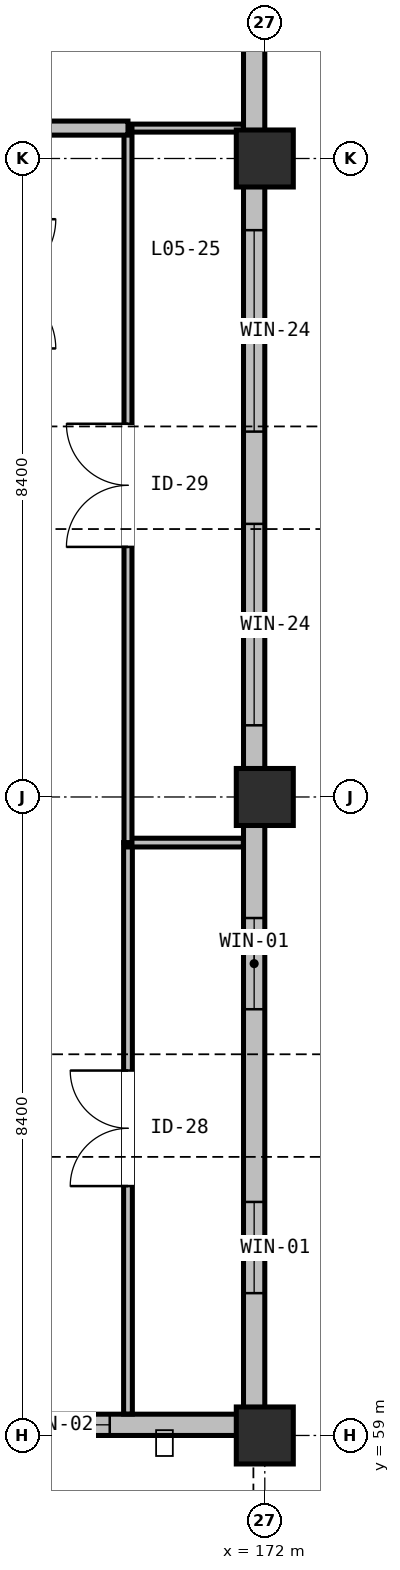
"""IFC4 building model, lengths in metres.
Left out: names, types, materials, properties, quantities, classifications, styles, units other than length and angle.
Written with IfcOpenShell. Run it as: python <this file> out.ifc"""

import sys

from ifc_helpers import new_model, si_unit, direction, frame, frame_2d, origin, origin_2d, place, context, subcontext, project, spatial, rectangle, extrude, element, fill, save


model = new_model("IFC4")
c1 = context("Model", 3, precision=1e-05, world=origin(), true_north=direction((0.0, 1.0)))
c2 = subcontext(c1, "Body", "Model", "MODEL_VIEW")
j1 = project(units=[si_unit("LENGTHUNIT", "METRE"), si_unit("PLANEANGLEUNIT", "RADIAN")], contexts=[c1])
p1 = place(None, origin())
s1 = spatial("IfcSite", under=j1, at=p1, CompositionType="ELEMENT")
p2 = place(p1, origin())
s2 = spatial("IfcBuilding", under=s1, at=p2, CompositionType="ELEMENT")
p3 = place(p2, frame((0.0, 0.0, 24.0)))
s3 = spatial("IfcBuildingStorey", under=s2, at=p3, CompositionType="ELEMENT", Elevation=24.0)
for number, where, z_axis, x_axis in (
    (1, (172.0, 59.0, 0.0), (0.0, 0.0, 1.0), (1.0, 0.0, 0.0)),
    (2, (172.0, 67.4, 0.0), (0.0, 0.0, 1.0), (1.0, 0.0, 0.0)),
    (3, (172.0, 75.8, 0.0), (0.0, 0.0, 1.0), (1.0, 0.0, 0.0)),
):
    element("IfcColumn", number, at=place(p3, frame(where, z_axis=z_axis, x_axis=x_axis)), inside=s3, PredefinedType="COLUMN", context=c2, shape_type="SweptSolid", body=[
        extrude(rectangle(XDim=0.75, YDim=0.75, at=origin_2d()), origin(), (0.0, 0.0, 1.0), 4.5),
    ])
p4 = place(p3, frame((171.86, 83.92, 0.0), z_axis=(0.0, 0.0, 1.0), x_axis=(0.0, -1.0, 0.0)))
e4 = element("IfcWall", 4, at=p4, inside=s3, PredefinedType="STANDARD", context=c2, shape_type="SweptSolid", body=[
    extrude(rectangle(XDim=8.12, YDim=0.28, at=frame_2d((4.06, 0.0))), origin(), (0.0, 0.0, 1.0), 3.885),
])
p5 = place(p4, frame((1.717, 0.0, 0.9)))
e5 = element("IfcOpeningElement", 5, at=p5, cuts=e4, PredefinedType="OPENING", context=c2, shape_type="SweptSolid", body=[
    extrude(rectangle(XDim=0.95, YDim=1.8, at=frame_2d((0.475, 0.9))), frame((0.0, 0.15, 0.0), z_axis=(0.0, -1.0, 0.0), x_axis=(1.0, 0.0, 0.0)), (0.0, 0.0, 1.0), 0.3),
])
p6 = place(p4, frame((5.453, 0.0, 0.9)))
e6 = element("IfcOpeningElement", 6, at=p6, cuts=e4, PredefinedType="OPENING", context=c2, shape_type="SweptSolid", body=[
    extrude(rectangle(XDim=0.95, YDim=1.8, at=frame_2d((0.475, 0.9))), frame((0.0, 0.15, 0.0), z_axis=(0.0, -1.0, 0.0), x_axis=(1.0, 0.0, 0.0)), (0.0, 0.0, 1.0), 0.3),
])
p7 = place(p3, frame((171.86, 75.8, 0.0), z_axis=(0.0, 0.0, 1.0), x_axis=(0.0, -1.0, 0.0)))
e7 = element("IfcWall", 7, at=p7, inside=s3, PredefinedType="STANDARD", context=c2, shape_type="SweptSolid", body=[
    extrude(rectangle(XDim=8.4, YDim=0.28, at=frame_2d((4.2, 0.0))), origin(), (0.0, 0.0, 1.0), 3.885),
])
p8 = place(p7, frame((0.943, 0.0, 0.9)))
e8 = element("IfcOpeningElement", 8, at=p8, cuts=e7, PredefinedType="OPENING", context=c2, shape_type="SweptSolid", body=[
    extrude(rectangle(XDim=2.65, YDim=1.85, at=frame_2d((1.325, 0.925))), frame((0.0, 0.15, 0.0), z_axis=(0.0, -1.0, 0.0), x_axis=(1.0, 0.0, 0.0)), (0.0, 0.0, 1.0), 0.3),
])
p9 = place(p7, frame((4.807, 0.0, 0.9)))
e9 = element("IfcOpeningElement", 9, at=p9, cuts=e7, PredefinedType="OPENING", context=c2, shape_type="SweptSolid", body=[
    extrude(rectangle(XDim=2.65, YDim=1.85, at=frame_2d((1.325, 0.925))), frame((0.0, 0.15, 0.0), z_axis=(0.0, -1.0, 0.0), x_axis=(1.0, 0.0, 0.0)), (0.0, 0.0, 1.0), 0.3),
])
p10 = place(p3, frame((171.86, 67.4, 0.0), z_axis=(0.0, 0.0, 1.0), x_axis=(0.0, -1.0, 0.0)))
e10 = element("IfcWall", 10, at=p10, inside=s3, PredefinedType="STANDARD", context=c2, shape_type="SweptSolid", body=[
    extrude(rectangle(XDim=8.12, YDim=0.28, at=frame_2d((4.06, 0.0))), origin(), (0.0, 0.0, 1.0), 3.885),
])
p11 = place(p10, frame((1.592, 0.0, 0.9)))
e11 = element("IfcOpeningElement", 11, at=p11, cuts=e10, PredefinedType="OPENING", context=c2, shape_type="SweptSolid", body=[
    extrude(rectangle(XDim=1.2, YDim=2.1, at=frame_2d((0.6, 1.05))), frame((0.0, 0.15, 0.0), z_axis=(0.0, -1.0, 0.0), x_axis=(1.0, 0.0, 0.0)), (0.0, 0.0, 1.0), 0.3),
])
p12 = place(p10, frame((5.328, 0.0, 0.9)))
e12 = element("IfcOpeningElement", 12, at=p12, cuts=e10, PredefinedType="OPENING", context=c2, shape_type="SweptSolid", body=[
    extrude(rectangle(XDim=1.2, YDim=2.1, at=frame_2d((0.6, 1.05))), frame((0.0, 0.15, 0.0), z_axis=(0.0, -1.0, 0.0), x_axis=(1.0, 0.0, 0.0)), (0.0, 0.0, 1.0), 0.3),
])
p13 = place(p3, frame((172.0, 59.14, 0.0), z_axis=(0.0, 0.0, 1.0), x_axis=(-1.0, 0.0, 0.0)))
e13 = element("IfcWall", 13, at=p13, inside=s3, PredefinedType="STANDARD", context=c2, shape_type="SweptSolid", body=[
    extrude(rectangle(XDim=6.8, YDim=0.28, at=frame_2d((3.4, 0.0))), origin(), (0.0, 0.0, 1.0), 3.735),
])
p14 = place(p13, frame((2.04, 0.0, 0.9)))
e14 = element("IfcOpeningElement", 14, at=p14, cuts=e13, PredefinedType="OPENING", context=c2, shape_type="SweptSolid", body=[
    extrude(rectangle(XDim=1.35, YDim=2.1, at=frame_2d((0.675, 1.05))), frame((0.0, 0.15, 0.0), z_axis=(0.0, -1.0, 0.0), x_axis=(1.0, 0.0, 0.0)), (0.0, 0.0, 1.0), 0.3),
])
p15 = place(p13, frame((4.289, 0.0, 0.9)))
e15 = element("IfcOpeningElement", 15, at=p15, cuts=e13, PredefinedType="OPENING", context=c2, shape_type="SweptSolid", body=[
    extrude(rectangle(XDim=1.35, YDim=2.1, at=frame_2d((0.675, 1.05))), frame((0.0, 0.15, 0.0), z_axis=(0.0, -1.0, 0.0), x_axis=(1.0, 0.0, 0.0)), (0.0, 0.0, 1.0), 0.3),
])
p16 = place(p3, frame((170.2, 59.282, 0.0), z_axis=(0.0, 0.0, 1.0), x_axis=(0.0, 1.0, 0.0)))
e16 = element("IfcWall", 16, at=p16, inside=s3, PredefinedType="PARTITIONING", context=c2, shape_type="SweptSolid", body=[
    extrude(rectangle(XDim=7.518, YDim=0.115, at=frame_2d((3.759, 0.0))), origin(), (0.0, 0.0, 1.0), 4.215),
])
p17 = place(p16, frame((2.999, 0.0, 0.0)))
e17 = element("IfcOpeningElement", 17, at=p17, cuts=e16, PredefinedType="OPENING", context=c2, shape_type="SweptSolid", body=[
    extrude(rectangle(XDim=1.52, YDim=2.14, at=frame_2d((0.76, 1.07))), frame((0.0, 0.067, 0.0), z_axis=(0.0, -1.0, 0.0), x_axis=(1.0, 0.0, 0.0)), (0.0, 0.0, 1.0), 0.135),
])
p18 = place(p3, frame((170.2, 66.8, 0.0), z_axis=(0.0, 0.0, 1.0), x_axis=(1.0, 0.0, 0.0)))
e18 = element("IfcWall", 18, at=p18, inside=s3, PredefinedType="PARTITIONING", context=c2, shape_type="SweptSolid", body=[
    extrude(rectangle(XDim=1.518, YDim=0.115, at=frame_2d((0.759, 0.0))), origin(), (0.0, 0.0, 1.0), 4.215),
])
p19 = place(p3, frame((170.2, 76.2, 0.0), z_axis=(0.0, 0.0, 1.0), x_axis=(1.0, 0.0, 0.0)))
e19 = element("IfcWall", 19, at=p19, inside=s3, PredefinedType="PARTITIONING", context=c2, shape_type="SweptSolid", body=[
    extrude(rectangle(XDim=1.518, YDim=0.105, at=frame_2d((0.759, 0.0))), origin(), (0.0, 0.0, 1.0), 4.215),
])
p20 = place(p3, frame((170.2, 66.8, 0.0), z_axis=(0.0, 0.0, 1.0), x_axis=(0.0, 1.0, 0.0)))
e20 = element("IfcWall", 20, at=p20, inside=s3, PredefinedType="PARTITIONING", context=c2, shape_type="SweptSolid", body=[
    extrude(rectangle(XDim=9.4, YDim=0.105, at=frame_2d((4.7, 0.0))), origin(), (0.0, 0.0, 1.0), 3.885),
])
p21 = place(p20, frame((3.89, 0.0, 0.0)))
e21 = element("IfcOpeningElement", 21, at=p21, cuts=e20, PredefinedType="OPENING", context=c2, shape_type="SweptSolid", body=[
    extrude(rectangle(XDim=1.62, YDim=2.14, at=frame_2d((0.81, 1.07))), frame((0.0, 0.062, 0.0), z_axis=(0.0, -1.0, 0.0), x_axis=(1.0, 0.0, 0.0)), (0.0, 0.0, 1.0), 0.125),
])
p22 = place(p3, frame((170.2, 76.2, 0.0), z_axis=(0.0, 0.0, 1.0), x_axis=(-1.0, 0.0, 0.0)))
e22 = element("IfcWall", 22, at=p22, inside=s3, PredefinedType="PARTITIONING", context=c2, shape_type="SweptSolid", body=[
    extrude(rectangle(XDim=1.8, YDim=0.185, at=frame_2d((0.9, 0.0))), origin(), (0.0, 0.0, 1.0), 3.985),
])
p23 = place(p8, origin())
e23 = element("IfcWindow", 23, at=p23, inside=s3, PartitioningType="SINGLE_PANEL", PredefinedType="WINDOW", context=c2, shape_type="SweptSolid", body=[
    extrude(rectangle(XDim=2.65, YDim=1.85, at=frame_2d((1.325, 0.925))), frame((0.0, 0.03, 0.0), z_axis=(0.0, -1.0, 0.0), x_axis=(1.0, 0.0, 0.0)), (0.0, 0.0, 1.0), 0.06),
])
fill(e8, e23)
p24 = place(p9, origin())
e24 = element("IfcWindow", 24, at=p24, inside=s3, PartitioningType="SINGLE_PANEL", PredefinedType="WINDOW", context=c2, shape_type="SweptSolid", body=[
    extrude(rectangle(XDim=2.65, YDim=1.85, at=frame_2d((1.325, 0.925))), frame((0.0, 0.03, 0.0), z_axis=(0.0, -1.0, 0.0), x_axis=(1.0, 0.0, 0.0)), (0.0, 0.0, 1.0), 0.06),
])
fill(e9, e24)
p25 = place(p11, origin())
e25 = element("IfcWindow", 25, at=p25, inside=s3, PartitioningType="SINGLE_PANEL", PredefinedType="WINDOW", context=c2, shape_type="SweptSolid", body=[
    extrude(rectangle(XDim=1.2, YDim=2.1, at=frame_2d((0.6, 1.05))), frame((0.0, 0.03, 0.0), z_axis=(0.0, -1.0, 0.0), x_axis=(1.0, 0.0, 0.0)), (0.0, 0.0, 1.0), 0.06),
])
fill(e11, e25)
p26 = place(p12, origin())
e26 = element("IfcWindow", 26, at=p26, inside=s3, PartitioningType="SINGLE_PANEL", PredefinedType="WINDOW", context=c2, shape_type="SweptSolid", body=[
    extrude(rectangle(XDim=1.2, YDim=2.1, at=frame_2d((0.6, 1.05))), frame((0.0, 0.03, 0.0), z_axis=(0.0, -1.0, 0.0), x_axis=(1.0, 0.0, 0.0)), (0.0, 0.0, 1.0), 0.06),
])
fill(e12, e26)
p27 = place(p14, origin())
e27 = element("IfcWindow", 27, at=p27, inside=s3, PartitioningType="SINGLE_PANEL", PredefinedType="WINDOW", context=c2, shape_type="SweptSolid", body=[
    extrude(rectangle(XDim=1.35, YDim=2.1, at=frame_2d((0.675, 1.05))), frame((0.0, 0.03, 0.0), z_axis=(0.0, -1.0, 0.0), x_axis=(1.0, 0.0, 0.0)), (0.0, 0.0, 1.0), 0.06),
])
fill(e14, e27)
p28 = place(p17, origin())
e28 = element("IfcDoor", 28, at=p28, inside=s3, OperationType="DOUBLE_DOOR_SINGLE_SWING", PredefinedType="DOOR", context=c2, shape_type="SweptSolid", body=[
    extrude(rectangle(XDim=1.52, YDim=2.14, at=frame_2d((0.76, 1.07))), frame((0.0, 0.025, 0.0), z_axis=(0.0, -1.0, 0.0), x_axis=(1.0, 0.0, 0.0)), (0.0, 0.0, 1.0), 0.05),
])
fill(e17, e28)
p29 = place(p21, origin())
e29 = element("IfcDoor", 29, at=p29, inside=s3, OperationType="DOUBLE_DOOR_SINGLE_SWING", PredefinedType="DOOR", context=c2, shape_type="SweptSolid", body=[
    extrude(rectangle(XDim=1.62, YDim=2.14, at=frame_2d((0.81, 1.07))), frame((0.0, 0.025, 0.0), z_axis=(0.0, -1.0, 0.0), x_axis=(1.0, 0.0, 0.0)), (0.0, 0.0, 1.0), 0.05),
])
fill(e21, e29)
save(model, sys.argv[1])
